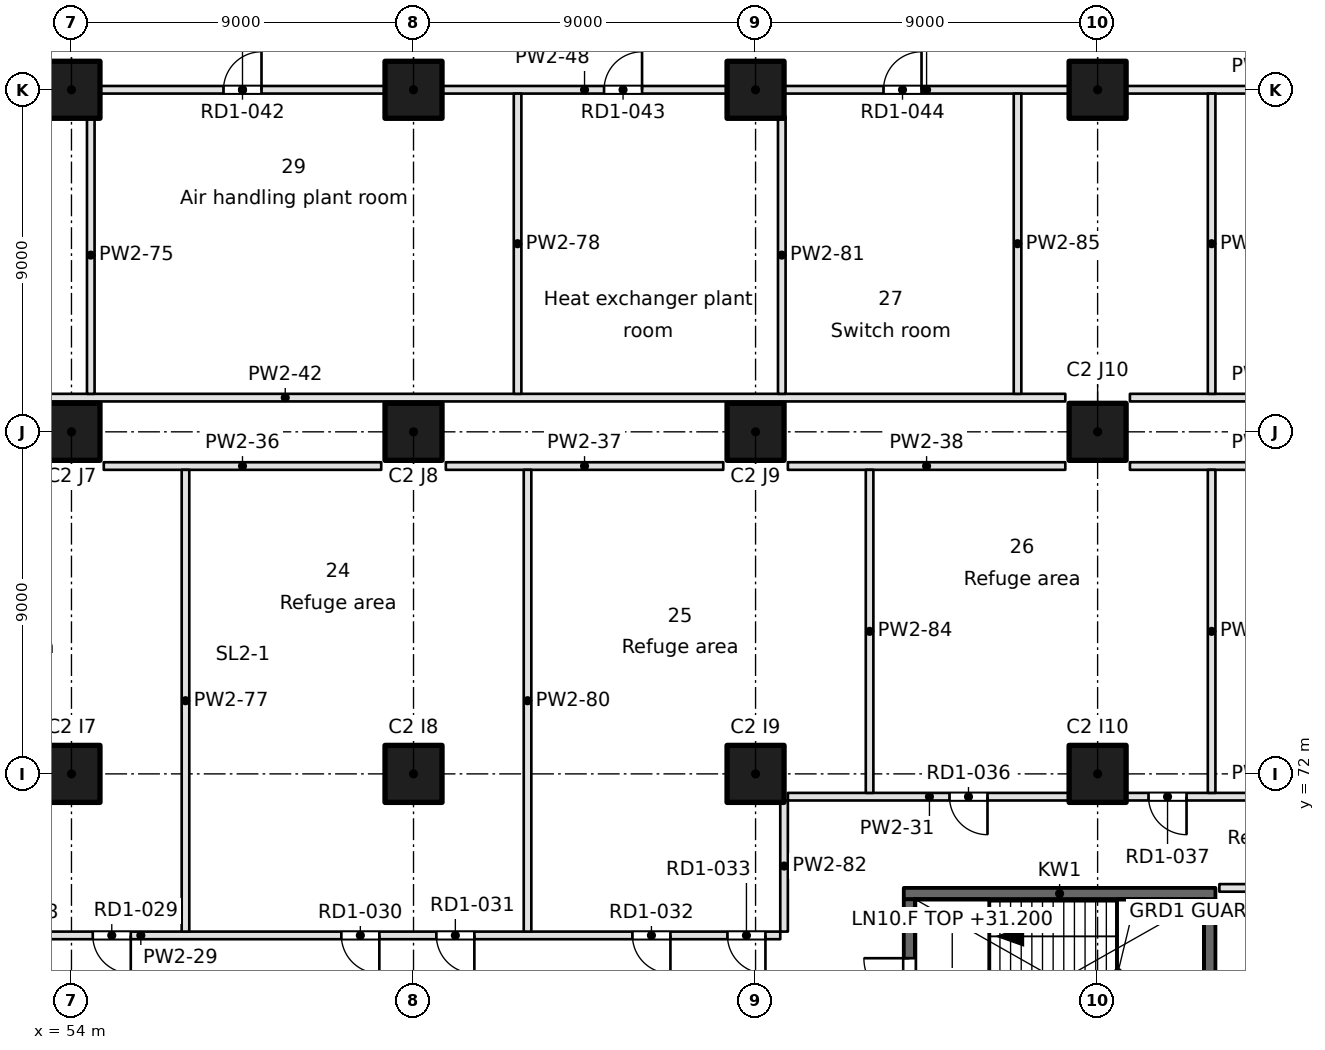
"""IFC4 building model, lengths in metres.
Left out: names, types, materials, properties, quantities, classifications, styles, units other than length and angle.
Written with IfcOpenShell. Run it as: python <this file> out.ifc"""

import sys

from ifc_helpers import new_model, si_unit, direction, frame, frame_2d, origin, origin_2d, place, context, subcontext, project, spatial, rectangle, extrude, element, fill, save


model = new_model("IFC4")
c1 = context("Model", 3, precision=1e-05, world=origin(), true_north=direction((0.0, 1.0)))
c2 = subcontext(c1, "Body", "Model", "MODEL_VIEW")
j1 = project(units=[si_unit("LENGTHUNIT", "METRE"), si_unit("PLANEANGLEUNIT", "RADIAN")], contexts=[c1])
p1 = place(None, origin())
s1 = spatial("IfcSite", under=j1, at=p1, CompositionType="ELEMENT")
p2 = place(p1, origin())
s2 = spatial("IfcBuilding", under=s1, at=p2, CompositionType="ELEMENT")
p3 = place(p2, frame((0.0, 0.0, 31.2)))
s3 = spatial("IfcBuildingStorey", under=s2, at=p3, CompositionType="ELEMENT", Elevation=31.2)
for number, where, z_axis, x_axis in (
    (1, (54.0, 72.0, 0.0), (0.0, 0.0, 1.0), (1.0, 0.0, 0.0)),
    (2, (54.0, 81.0, 0.0), (0.0, 0.0, 1.0), (1.0, 0.0, 0.0)),
    (3, (54.0, 90.0, 0.0), (0.0, 0.0, 1.0), (1.0, 0.0, 0.0)),
    (4, (63.0, 72.0, 0.0), (0.0, 0.0, 1.0), (1.0, 0.0, 0.0)),
    (5, (63.0, 81.0, 0.0), (0.0, 0.0, 1.0), (1.0, 0.0, 0.0)),
    (6, (63.0, 90.0, 0.0), (0.0, 0.0, 1.0), (1.0, 0.0, 0.0)),
    (7, (72.0, 72.0, 0.0), (0.0, 0.0, 1.0), (1.0, 0.0, 0.0)),
    (8, (72.0, 81.0, 0.0), (0.0, 0.0, 1.0), (1.0, 0.0, 0.0)),
    (9, (72.0, 90.0, 0.0), (0.0, 0.0, 1.0), (1.0, 0.0, 0.0)),
    (10, (81.0, 72.0, 0.0), (0.0, 0.0, 1.0), (1.0, 0.0, 0.0)),
    (11, (81.0, 81.0, 0.0), (0.0, 0.0, 1.0), (1.0, 0.0, 0.0)),
    (12, (81.0, 90.0, 0.0), (0.0, 0.0, 1.0), (1.0, 0.0, 0.0)),
):
    element("IfcColumn", number, at=place(p3, frame(where, z_axis=z_axis, x_axis=x_axis)), inside=s3, PredefinedType="COLUMN", context=c2, shape_type="SweptSolid", body=[
        extrude(rectangle(XDim=1.5, YDim=1.5, at=origin_2d()), origin(), (0.0, 0.0, 1.0), 4.6),
    ])
p4 = place(p3, frame((75.9, 68.85, -0.45), z_axis=(0.0, 0.0, 1.0), x_axis=(1.0, 0.0, 0.0)))
e13 = element("IfcWall", 13, at=p4, inside=s3, PredefinedType="SOLIDWALL", context=c2, shape_type="SweptSolid", body=[
    extrude(rectangle(XDim=8.2, YDim=0.3, at=frame_2d((4.1, 0.0))), origin(), (0.0, 0.0, 1.0), 4.65),
])
p5 = place(p3, frame((76.05, 64.4, -0.45), z_axis=(0.0, 0.0, 1.0), x_axis=(0.0, 1.0, 0.0)))
e14 = element("IfcWall", 14, at=p5, inside=s3, PredefinedType="SOLIDWALL", context=c2, shape_type="SweptSolid", body=[
    extrude(rectangle(XDim=4.3, YDim=0.3, at=frame_2d((2.15, 0.0))), origin(), (0.0, 0.0, 1.0), 4.65),
])
p6 = place(p5, frame((1.55, 0.0, 0.45)))
e15 = element("IfcOpeningElement", 15, at=p6, cuts=e14, PredefinedType="OPENING", context=c2, shape_type="SweptSolid", body=[
    extrude(rectangle(XDim=1.2, YDim=2.1, at=frame_2d((0.6, 1.05))), frame((0.0, 0.15, 0.0), z_axis=(0.0, -1.0, 0.0), x_axis=(1.0, 0.0, 0.0)), (0.0, 0.0, 1.0), 0.3),
])
p7 = place(p3, frame((83.95, 64.4, -0.45), z_axis=(0.0, 0.0, 1.0), x_axis=(0.0, 1.0, 0.0)))
e16 = element("IfcWall", 16, at=p7, inside=s3, PredefinedType="SOLIDWALL", context=c2, shape_type="SweptSolid", body=[
    extrude(rectangle(XDim=4.3, YDim=0.3, at=frame_2d((2.15, 0.0))), origin(), (0.0, 0.0, 1.0), 4.65),
])
p8 = place(p3, frame((39.0, 67.75, 0.0), z_axis=(0.0, 0.0, 1.0), x_axis=(1.0, 0.0, 0.0)))
e17 = element("IfcWall", 17, at=p8, inside=s3, PredefinedType="PARTITIONING", context=c2, shape_type="SweptSolid", body=[
    extrude(rectangle(XDim=33.65, YDim=0.2, at=frame_2d((16.825, 0.0))), origin(), (0.0, 0.0, 1.0), 4.2),
])
p9 = place(p8, frame((13.06, 0.0, 0.0)))
e18 = element("IfcOpeningElement", 18, at=p9, cuts=e17, PredefinedType="OPENING", context=c2, shape_type="SweptSolid", body=[
    extrude(rectangle(XDim=1.0, YDim=2.1, at=frame_2d((0.5, 1.05))), frame((0.0, 0.1, 0.0), z_axis=(0.0, -1.0, 0.0), x_axis=(1.0, 0.0, 0.0)), (0.0, 0.0, 1.0), 0.2),
])
p10 = place(p8, frame((15.56, 0.0, 0.0)))
e19 = element("IfcOpeningElement", 19, at=p10, cuts=e17, PredefinedType="OPENING", context=c2, shape_type="SweptSolid", body=[
    extrude(rectangle(XDim=1.0, YDim=2.1, at=frame_2d((0.5, 1.05))), frame((0.0, 0.1, 0.0), z_axis=(0.0, -1.0, 0.0), x_axis=(1.0, 0.0, 0.0)), (0.0, 0.0, 1.0), 0.2),
])
p11 = place(p8, frame((22.101, 0.0, 0.0)))
e20 = element("IfcOpeningElement", 20, at=p11, cuts=e17, PredefinedType="OPENING", context=c2, shape_type="SweptSolid", body=[
    extrude(rectangle(XDim=1.0, YDim=2.1, at=frame_2d((0.5, 1.05))), frame((0.0, 0.1, 0.0), z_axis=(0.0, -1.0, 0.0), x_axis=(1.0, 0.0, 0.0)), (0.0, 0.0, 1.0), 0.2),
])
p12 = place(p8, frame((24.601, 0.0, 0.0)))
e21 = element("IfcOpeningElement", 21, at=p12, cuts=e17, PredefinedType="OPENING", context=c2, shape_type="SweptSolid", body=[
    extrude(rectangle(XDim=1.0, YDim=2.1, at=frame_2d((0.5, 1.05))), frame((0.0, 0.1, 0.0), z_axis=(0.0, -1.0, 0.0), x_axis=(1.0, 0.0, 0.0)), (0.0, 0.0, 1.0), 0.2),
])
p13 = place(p8, frame((29.76, 0.0, 0.0)))
e22 = element("IfcOpeningElement", 22, at=p13, cuts=e17, PredefinedType="OPENING", context=c2, shape_type="SweptSolid", body=[
    extrude(rectangle(XDim=1.0, YDim=2.1, at=frame_2d((0.5, 1.05))), frame((0.0, 0.1, 0.0), z_axis=(0.0, -1.0, 0.0), x_axis=(1.0, 0.0, 0.0)), (0.0, 0.0, 1.0), 0.2),
])
p14 = place(p8, frame((32.26, 0.0, 0.0)))
e23 = element("IfcOpeningElement", 23, at=p14, cuts=e17, PredefinedType="OPENING", context=c2, shape_type="SweptSolid", body=[
    extrude(rectangle(XDim=1.0, YDim=2.1, at=frame_2d((0.5, 1.05))), frame((0.0, 0.1, 0.0), z_axis=(0.0, -1.0, 0.0), x_axis=(1.0, 0.0, 0.0)), (0.0, 0.0, 1.0), 0.2),
])
p15 = place(p3, frame((96.3, 69.0, 0.0), z_axis=(0.0, 0.0, 1.0), x_axis=(-1.0, 0.0, 0.0)))
e24 = element("IfcWall", 24, at=p15, inside=s3, PredefinedType="PARTITIONING", context=c2, shape_type="SweptSolid", body=[
    extrude(rectangle(XDim=12.096, YDim=0.2, at=frame_2d((6.048, 0.0))), origin(), (0.0, 0.0, 1.0), 4.2),
])
p16 = place(p15, frame((5.548, 0.0, 0.0)))
e25 = element("IfcOpeningElement", 25, at=p16, cuts=e24, PredefinedType="OPENING", context=c2, shape_type="SweptSolid", body=[
    extrude(rectangle(XDim=1.0, YDim=2.1, at=frame_2d((0.5, 1.05))), frame((0.0, 0.1, 0.0), z_axis=(0.0, -1.0, 0.0), x_axis=(1.0, 0.0, 0.0)), (0.0, 0.0, 1.0), 0.2),
])
p17 = place(p15, frame((3.048, 0.0, 0.0)))
e26 = element("IfcOpeningElement", 26, at=p17, cuts=e24, PredefinedType="OPENING", context=c2, shape_type="SweptSolid", body=[
    extrude(rectangle(XDim=1.0, YDim=2.1, at=frame_2d((0.5, 1.05))), frame((0.0, 0.1, 0.0), z_axis=(0.0, -1.0, 0.0), x_axis=(1.0, 0.0, 0.0)), (0.0, 0.0, 1.0), 0.2),
])
p18 = place(p3, frame((72.85, 71.4, 0.0), z_axis=(0.0, 0.0, 1.0), x_axis=(1.0, 0.0, 0.0)))
e27 = element("IfcWall", 27, at=p18, inside=s3, PredefinedType="PARTITIONING", context=c2, shape_type="SweptSolid", body=[
    extrude(rectangle(XDim=7.45, YDim=0.2, at=frame_2d((3.725, 0.0))), origin(), (0.0, 0.0, 1.0), 4.2),
])
p19 = place(p18, frame((4.253, 0.0, 0.0)))
e28 = element("IfcOpeningElement", 28, at=p19, cuts=e27, PredefinedType="OPENING", context=c2, shape_type="SweptSolid", body=[
    extrude(rectangle(XDim=1.0, YDim=2.1, at=frame_2d((0.5, 1.05))), frame((0.0, 0.1, 0.0), z_axis=(0.0, -1.0, 0.0), x_axis=(1.0, 0.0, 0.0)), (0.0, 0.0, 1.0), 0.2),
])
p20 = place(p3, frame((81.7, 71.4, 0.0), z_axis=(0.0, 0.0, 1.0), x_axis=(1.0, 0.0, 0.0)))
e29 = element("IfcWall", 29, at=p20, inside=s3, PredefinedType="PARTITIONING", context=c2, shape_type="SweptSolid", body=[
    extrude(rectangle(XDim=7.6, YDim=0.2, at=frame_2d((3.8, 0.0))), origin(), (0.0, 0.0, 1.0), 4.2),
])
p21 = place(p20, frame((0.64, 0.0, 0.0)))
e30 = element("IfcOpeningElement", 30, at=p21, cuts=e29, PredefinedType="OPENING", context=c2, shape_type="SweptSolid", body=[
    extrude(rectangle(XDim=1.0, YDim=2.1, at=frame_2d((0.5, 1.05))), frame((0.0, 0.1, 0.0), z_axis=(0.0, -1.0, 0.0), x_axis=(1.0, 0.0, 0.0)), (0.0, 0.0, 1.0), 0.2),
])
for number, where, z_axis, x_axis in (
    (31, (54.85, 80.1, 0.0), (0.0, 0.0, 1.0), (1.0, 0.0, 0.0)),
    (32, (63.85, 80.1, 0.0), (0.0, 0.0, 1.0), (1.0, 0.0, 0.0)),
    (33, (72.85, 80.1, 0.0), (0.0, 0.0, 1.0), (1.0, 0.0, 0.0)),
    (34, (81.85, 80.1, 0.0), (0.0, 0.0, 1.0), (1.0, 0.0, 0.0)),
):
    element("IfcWall", number, at=place(p3, frame(where, z_axis=z_axis, x_axis=x_axis)), inside=s3, PredefinedType="PARTITIONING", context=c2, shape_type="SweptSolid", body=[
        extrude(rectangle(XDim=7.3, YDim=0.2, at=frame_2d((3.65, 0.0))), origin(), (0.0, 0.0, 1.0), 4.2),
    ])
p22 = place(p3, frame((39.1, 81.9, 0.0), z_axis=(0.0, 0.0, 1.0), x_axis=(1.0, 0.0, 0.0)))
e35 = element("IfcWall", 35, at=p22, inside=s3, PredefinedType="PARTITIONING", context=c2, shape_type="SweptSolid", body=[
    extrude(rectangle(XDim=41.05, YDim=0.2, at=frame_2d((20.525, 0.0))), origin(), (0.0, 0.0, 1.0), 4.2),
])
p23 = place(p3, frame((81.85, 81.9, 0.0), z_axis=(0.0, 0.0, 1.0), x_axis=(1.0, 0.0, 0.0)))
e36 = element("IfcWall", 36, at=p23, inside=s3, PredefinedType="PARTITIONING", context=c2, shape_type="SweptSolid", body=[
    extrude(rectangle(XDim=7.3, YDim=0.2, at=frame_2d((3.65, 0.0))), origin(), (0.0, 0.0, 1.0), 4.2),
])
p24 = place(p3, frame((62.3, 90.0, 0.0), z_axis=(0.0, 0.0, 1.0), x_axis=(-1.0, 0.0, 0.0)))
e37 = element("IfcWall", 37, at=p24, inside=s3, PredefinedType="PARTITIONING", context=c2, shape_type="SweptSolid", body=[
    extrude(rectangle(XDim=7.6, YDim=0.2, at=frame_2d((3.8, 0.0))), origin(), (0.0, 0.0, 1.0), 4.2),
])
p25 = place(p24, frame((3.3, 0.0, 0.0)))
e38 = element("IfcOpeningElement", 38, at=p25, cuts=e37, PredefinedType="OPENING", context=c2, shape_type="SweptSolid", body=[
    extrude(rectangle(XDim=1.0, YDim=2.1, at=frame_2d((0.5, 1.05))), frame((0.0, 0.1, 0.0), z_axis=(0.0, -1.0, 0.0), x_axis=(1.0, 0.0, 0.0)), (0.0, 0.0, 1.0), 0.2),
])
p26 = place(p3, frame((71.3, 90.0, 0.0), z_axis=(0.0, 0.0, 1.0), x_axis=(-1.0, 0.0, 0.0)))
e39 = element("IfcWall", 39, at=p26, inside=s3, PredefinedType="PARTITIONING", context=c2, shape_type="SweptSolid", body=[
    extrude(rectangle(XDim=7.6, YDim=0.2, at=frame_2d((3.8, 0.0))), origin(), (0.0, 0.0, 1.0), 4.2),
])
p27 = place(p26, frame((2.287, 0.0, 0.0)))
e40 = element("IfcOpeningElement", 40, at=p27, cuts=e39, PredefinedType="OPENING", context=c2, shape_type="SweptSolid", body=[
    extrude(rectangle(XDim=1.0, YDim=2.1, at=frame_2d((0.5, 1.05))), frame((0.0, 0.1, 0.0), z_axis=(0.0, -1.0, 0.0), x_axis=(1.0, 0.0, 0.0)), (0.0, 0.0, 1.0), 0.2),
])
p28 = place(p3, frame((80.3, 90.0, 0.0), z_axis=(0.0, 0.0, 1.0), x_axis=(-1.0, 0.0, 0.0)))
e41 = element("IfcWall", 41, at=p28, inside=s3, PredefinedType="PARTITIONING", context=c2, shape_type="SweptSolid", body=[
    extrude(rectangle(XDim=7.6, YDim=0.2, at=frame_2d((3.8, 0.0))), origin(), (0.0, 0.0, 1.0), 4.2),
])
p29 = place(p28, frame((3.933, 0.0, 0.0)))
e42 = element("IfcOpeningElement", 42, at=p29, cuts=e41, PredefinedType="OPENING", context=c2, shape_type="SweptSolid", body=[
    extrude(rectangle(XDim=1.0, YDim=2.1, at=frame_2d((0.5, 1.05))), frame((0.0, 0.1, 0.0), z_axis=(0.0, -1.0, 0.0), x_axis=(1.0, 0.0, 0.0)), (0.0, 0.0, 1.0), 0.2),
])
p30 = place(p3, frame((89.3, 90.0, 0.0), z_axis=(0.0, 0.0, 1.0), x_axis=(-1.0, 0.0, 0.0)))
e43 = element("IfcWall", 43, at=p30, inside=s3, PredefinedType="PARTITIONING", context=c2, shape_type="SweptSolid", body=[
    extrude(rectangle(XDim=7.6, YDim=0.2, at=frame_2d((3.8, 0.0))), origin(), (0.0, 0.0, 1.0), 4.2),
])
p31 = place(p3, frame((54.508, 89.3, 0.0), z_axis=(0.0, 0.0, 1.0), x_axis=(0.0, -1.0, 0.0)))
e44 = element("IfcWall", 44, at=p31, inside=s3, PredefinedType="PARTITIONING", context=c2, shape_type="SweptSolid", body=[
    extrude(rectangle(XDim=7.3, YDim=0.2, at=frame_2d((3.65, 0.0))), origin(), (0.0, 0.0, 1.0), 4.2),
])
p32 = place(p3, frame((57.0, 80.0, 0.0), z_axis=(0.0, 0.0, 1.0), x_axis=(0.0, -1.0, 0.0)))
e45 = element("IfcWall", 45, at=p32, inside=s3, PredefinedType="PARTITIONING", context=c2, shape_type="SweptSolid", body=[
    extrude(rectangle(XDim=12.15, YDim=0.2, at=frame_2d((6.075, 0.0))), origin(), (0.0, 0.0, 1.0), 4.2),
])
p33 = place(p3, frame((65.738, 89.9, 0.0), z_axis=(0.0, 0.0, 1.0), x_axis=(0.0, -1.0, 0.0)))
e46 = element("IfcWall", 46, at=p33, inside=s3, PredefinedType="PARTITIONING", context=c2, shape_type="SweptSolid", body=[
    extrude(rectangle(XDim=7.9, YDim=0.2, at=frame_2d((3.95, 0.0))), origin(), (0.0, 0.0, 1.0), 4.2),
])
p34 = place(p3, frame((66.0, 80.0, 0.0), z_axis=(0.0, 0.0, 1.0), x_axis=(0.0, -1.0, 0.0)))
e47 = element("IfcWall", 47, at=p34, inside=s3, PredefinedType="PARTITIONING", context=c2, shape_type="SweptSolid", body=[
    extrude(rectangle(XDim=12.15, YDim=0.2, at=frame_2d((6.075, 0.0))), origin(), (0.0, 0.0, 1.0), 4.2),
])
p35 = place(p3, frame((72.69, 89.3, 0.0), z_axis=(0.0, 0.0, 1.0), x_axis=(0.0, -1.0, 0.0)))
e48 = element("IfcWall", 48, at=p35, inside=s3, PredefinedType="PARTITIONING", context=c2, shape_type="SweptSolid", body=[
    extrude(rectangle(XDim=7.3, YDim=0.2, at=frame_2d((3.65, 0.0))), origin(), (0.0, 0.0, 1.0), 4.2),
])
p36 = place(p3, frame((72.75, 67.85, 0.0), z_axis=(0.0, 0.0, 1.0), x_axis=(0.0, 1.0, 0.0)))
e49 = element("IfcWall", 49, at=p36, inside=s3, PredefinedType="PARTITIONING", context=c2, shape_type="SweptSolid", body=[
    extrude(rectangle(XDim=3.45, YDim=0.2, at=frame_2d((1.725, 0.0))), origin(), (0.0, 0.0, 1.0), 4.2),
])
p37 = place(p3, frame((75.0, 80.0, 0.0), z_axis=(0.0, 0.0, 1.0), x_axis=(0.0, -1.0, 0.0)))
e50 = element("IfcWall", 50, at=p37, inside=s3, PredefinedType="PARTITIONING", context=c2, shape_type="SweptSolid", body=[
    extrude(rectangle(XDim=8.5, YDim=0.2, at=frame_2d((4.25, 0.0))), origin(), (0.0, 0.0, 1.0), 4.2),
])
p38 = place(p3, frame((78.893, 89.9, 0.0), z_axis=(0.0, 0.0, 1.0), x_axis=(0.0, -1.0, 0.0)))
e51 = element("IfcWall", 51, at=p38, inside=s3, PredefinedType="PARTITIONING", context=c2, shape_type="SweptSolid", body=[
    extrude(rectangle(XDim=7.9, YDim=0.2, at=frame_2d((3.95, 0.0))), origin(), (0.0, 0.0, 1.0), 4.2),
])
p39 = place(p3, frame((84.0, 80.0, 0.0), z_axis=(0.0, 0.0, 1.0), x_axis=(0.0, -1.0, 0.0)))
e52 = element("IfcWall", 52, at=p39, inside=s3, PredefinedType="PARTITIONING", context=c2, shape_type="SweptSolid", body=[
    extrude(rectangle(XDim=8.5, YDim=0.2, at=frame_2d((4.25, 0.0))), origin(), (0.0, 0.0, 1.0), 4.2),
])
p40 = place(p3, frame((84.0, 89.9, 0.0), z_axis=(0.0, 0.0, 1.0), x_axis=(0.0, -1.0, 0.0)))
e53 = element("IfcWall", 53, at=p40, inside=s3, PredefinedType="PARTITIONING", context=c2, shape_type="SweptSolid", body=[
    extrude(rectangle(XDim=7.9, YDim=0.2, at=frame_2d((3.95, 0.0))), origin(), (0.0, 0.0, 1.0), 4.2),
])
p41 = place(p6, origin())
e54 = element("IfcDoor", 54, at=p41, inside=s3, OperationType="SINGLE_SWING_RIGHT", PredefinedType="DOOR", context=c2, shape_type="SweptSolid", body=[
    extrude(rectangle(XDim=1.2, YDim=2.1, at=frame_2d((0.6, 1.05))), frame((0.0, 0.025, 0.0), z_axis=(0.0, -1.0, 0.0), x_axis=(1.0, 0.0, 0.0)), (0.0, 0.0, 1.0), 0.05),
])
fill(e15, e54)
p42 = place(p10, frame((1.0, 0.0, 0.0), z_axis=(0.0, 0.0, 1.0), x_axis=(-1.0, 0.0, 0.0)))
e55 = element("IfcDoor", 55, at=p42, inside=s3, OperationType="SINGLE_SWING_LEFT", PredefinedType="DOOR", context=c2, shape_type="SweptSolid", body=[
    extrude(rectangle(XDim=1.0, YDim=2.1, at=frame_2d((0.5, 1.05))), frame((0.0, 0.025, 0.0), z_axis=(0.0, -1.0, 0.0), x_axis=(1.0, 0.0, 0.0)), (0.0, 0.0, 1.0), 0.05),
])
fill(e19, e55)
p43 = place(p11, frame((1.0, 0.0, 0.0), z_axis=(0.0, 0.0, 1.0), x_axis=(-1.0, 0.0, 0.0)))
e56 = element("IfcDoor", 56, at=p43, inside=s3, OperationType="SINGLE_SWING_LEFT", PredefinedType="DOOR", context=c2, shape_type="SweptSolid", body=[
    extrude(rectangle(XDim=1.0, YDim=2.1, at=frame_2d((0.5, 1.05))), frame((0.0, 0.025, 0.0), z_axis=(0.0, -1.0, 0.0), x_axis=(1.0, 0.0, 0.0)), (0.0, 0.0, 1.0), 0.05),
])
fill(e20, e56)
p44 = place(p12, frame((1.0, 0.0, 0.0), z_axis=(0.0, 0.0, 1.0), x_axis=(-1.0, 0.0, 0.0)))
e57 = element("IfcDoor", 57, at=p44, inside=s3, OperationType="SINGLE_SWING_LEFT", PredefinedType="DOOR", context=c2, shape_type="SweptSolid", body=[
    extrude(rectangle(XDim=1.0, YDim=2.1, at=frame_2d((0.5, 1.05))), frame((0.0, 0.025, 0.0), z_axis=(0.0, -1.0, 0.0), x_axis=(1.0, 0.0, 0.0)), (0.0, 0.0, 1.0), 0.05),
])
fill(e21, e57)
p45 = place(p13, frame((1.0, 0.0, 0.0), z_axis=(0.0, 0.0, 1.0), x_axis=(-1.0, 0.0, 0.0)))
e58 = element("IfcDoor", 58, at=p45, inside=s3, OperationType="SINGLE_SWING_LEFT", PredefinedType="DOOR", context=c2, shape_type="SweptSolid", body=[
    extrude(rectangle(XDim=1.0, YDim=2.1, at=frame_2d((0.5, 1.05))), frame((0.0, 0.025, 0.0), z_axis=(0.0, -1.0, 0.0), x_axis=(1.0, 0.0, 0.0)), (0.0, 0.0, 1.0), 0.05),
])
fill(e22, e58)
p46 = place(p14, frame((1.0, 0.0, 0.0), z_axis=(0.0, 0.0, 1.0), x_axis=(-1.0, 0.0, 0.0)))
e59 = element("IfcDoor", 59, at=p46, inside=s3, OperationType="SINGLE_SWING_LEFT", PredefinedType="DOOR", context=c2, shape_type="SweptSolid", body=[
    extrude(rectangle(XDim=1.0, YDim=2.1, at=frame_2d((0.5, 1.05))), frame((0.0, 0.025, 0.0), z_axis=(0.0, -1.0, 0.0), x_axis=(1.0, 0.0, 0.0)), (0.0, 0.0, 1.0), 0.05),
])
fill(e23, e59)
p47 = place(p19, frame((1.0, 0.0, 0.0), z_axis=(0.0, 0.0, 1.0), x_axis=(-1.0, 0.0, 0.0)))
e60 = element("IfcDoor", 60, at=p47, inside=s3, OperationType="SINGLE_SWING_LEFT", PredefinedType="DOOR", context=c2, shape_type="SweptSolid", body=[
    extrude(rectangle(XDim=1.0, YDim=2.1, at=frame_2d((0.5, 1.05))), frame((0.0, 0.025, 0.0), z_axis=(0.0, -1.0, 0.0), x_axis=(1.0, 0.0, 0.0)), (0.0, 0.0, 1.0), 0.05),
])
fill(e28, e60)
p48 = place(p21, frame((1.0, 0.0, 0.0), z_axis=(0.0, 0.0, 1.0), x_axis=(-1.0, 0.0, 0.0)))
e61 = element("IfcDoor", 61, at=p48, inside=s3, OperationType="SINGLE_SWING_LEFT", PredefinedType="DOOR", context=c2, shape_type="SweptSolid", body=[
    extrude(rectangle(XDim=1.0, YDim=2.1, at=frame_2d((0.5, 1.05))), frame((0.0, 0.025, 0.0), z_axis=(0.0, -1.0, 0.0), x_axis=(1.0, 0.0, 0.0)), (0.0, 0.0, 1.0), 0.05),
])
fill(e30, e61)
p49 = place(p25, frame((1.0, 0.0, 0.0), z_axis=(0.0, 0.0, 1.0), x_axis=(-1.0, 0.0, 0.0)))
e62 = element("IfcDoor", 62, at=p49, inside=s3, OperationType="SINGLE_SWING_RIGHT", PredefinedType="DOOR", context=c2, shape_type="SweptSolid", body=[
    extrude(rectangle(XDim=1.0, YDim=2.1, at=frame_2d((0.5, 1.05))), frame((0.0, 0.025, 0.0), z_axis=(0.0, -1.0, 0.0), x_axis=(1.0, 0.0, 0.0)), (0.0, 0.0, 1.0), 0.05),
])
fill(e38, e62)
p50 = place(p27, frame((1.0, 0.0, 0.0), z_axis=(0.0, 0.0, 1.0), x_axis=(-1.0, 0.0, 0.0)))
e63 = element("IfcDoor", 63, at=p50, inside=s3, OperationType="SINGLE_SWING_RIGHT", PredefinedType="DOOR", context=c2, shape_type="SweptSolid", body=[
    extrude(rectangle(XDim=1.0, YDim=2.1, at=frame_2d((0.5, 1.05))), frame((0.0, 0.025, 0.0), z_axis=(0.0, -1.0, 0.0), x_axis=(1.0, 0.0, 0.0)), (0.0, 0.0, 1.0), 0.05),
])
fill(e40, e63)
p51 = place(p29, frame((1.0, 0.0, 0.0), z_axis=(0.0, 0.0, 1.0), x_axis=(-1.0, 0.0, 0.0)))
e64 = element("IfcDoor", 64, at=p51, inside=s3, OperationType="SINGLE_SWING_RIGHT", PredefinedType="DOOR", context=c2, shape_type="SweptSolid", body=[
    extrude(rectangle(XDim=1.0, YDim=2.1, at=frame_2d((0.5, 1.05))), frame((0.0, 0.025, 0.0), z_axis=(0.0, -1.0, 0.0), x_axis=(1.0, 0.0, 0.0)), (0.0, 0.0, 1.0), 0.05),
])
fill(e42, e64)
save(model, sys.argv[1])
